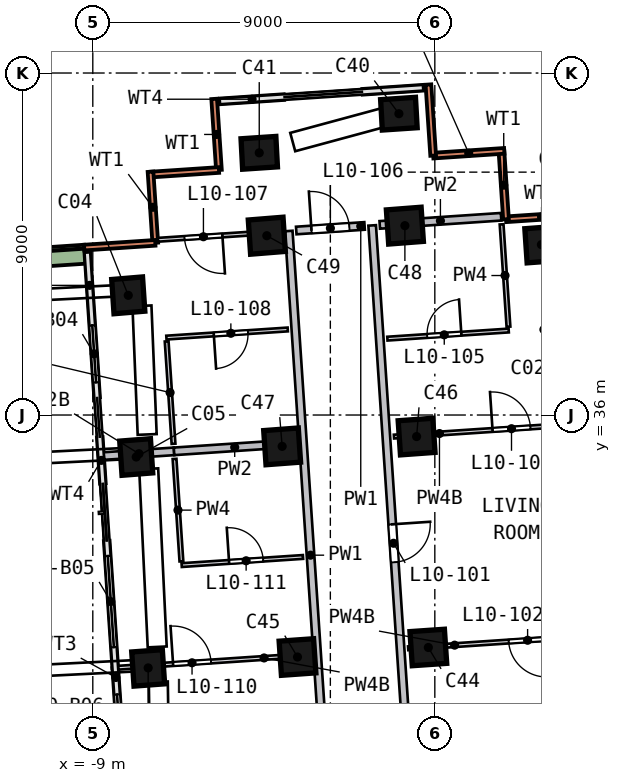
"""IFC4 building model, lengths in metres.
Left out: names, types, materials, properties, quantities, classifications, styles, units other than length and angle.
Written with IfcOpenShell. Run it as: python <this file> out.ifc"""

import sys

from ifc_helpers import new_model, si_unit, direction, frame, frame_2d, origin, origin_2d, place, context, subcontext, project, spatial, rectangle, extrude, element, fill, save


model = new_model("IFC4")
c1 = context("Model", 3, precision=1e-05, world=origin(), true_north=direction((0.0, 1.0)))
c2 = subcontext(c1, "Body", "Model", "MODEL_VIEW")
j1 = project(units=[si_unit("LENGTHUNIT", "METRE"), si_unit("PLANEANGLEUNIT", "RADIAN")], contexts=[c1])
p1 = place(None, origin())
s1 = spatial("IfcSite", under=j1, at=p1, CompositionType="ELEMENT")
p2 = place(p1, origin())
s2 = spatial("IfcBuilding", under=s1, at=p2, CompositionType="ELEMENT")
p3 = place(p2, frame((0.0, 0.0, 49.5)))
s3 = spatial("IfcBuildingStorey", under=s2, at=p3, CompositionType="ELEMENT", Elevation=49.5)
p4 = place(p3, frame((3.514, 35.74, 0.0), z_axis=(-0.16539803, -0.025428438, 0.985899024), x_axis=(-0.069309244, 0.997495574, 0.014099965)))
e1 = element("IfcColumn", 1, at=p4, inside=s3, PredefinedType="COLUMN", context=c2, shape_type="SweptSolid", body=[
    extrude(rectangle(XDim=0.9, YDim=0.8, at=origin_2d()), origin(), (0.0, 0.0, 1.0), 3.236),
])
p5 = place(p3, frame((3.032, 40.542, 0.0), z_axis=(-0.185536283, -0.047999063, 0.981464405), x_axis=(-0.073598719, 0.996679535, 0.034830047)))
e2 = element("IfcColumn", 2, at=p5, inside=s3, PredefinedType="COLUMN", context=c2, shape_type="SweptSolid", body=[
    extrude(rectangle(XDim=0.9, YDim=0.8, at=origin_2d()), origin(), (0.0, 0.0, 1.0), 3.25),
])
p6 = place(p3, frame((-7.848, 39.271, 0.0), z_axis=(-0.178617656, -0.098749191, 0.978950627), x_axis=(0.082596476, -0.992943836, -0.085090309)))
e3 = element("IfcColumn", 3, at=p6, inside=s3, PredefinedType="COLUMN", context=c2, shape_type="SweptSolid", body=[
    extrude(rectangle(XDim=0.9, YDim=0.8, at=origin_2d()), origin(), (0.0, 0.0, 1.0), 3.259),
])
p7 = place(p3, frame((-7.66, 34.99, 0.0), z_axis=(-0.161138739, -0.077933923, 0.983849892), x_axis=(0.077576177, -0.994793135, -0.066095046)))
e4 = element("IfcColumn", 4, at=p7, inside=s3, PredefinedType="COLUMN", context=c2, shape_type="SweptSolid", body=[
    extrude(rectangle(XDim=0.9, YDim=0.8, at=origin_2d()), origin(), (0.0, 0.0, 1.0), 3.242),
])
p8 = place(p3, frame((-7.376, 29.414, 0.0), z_axis=(-0.137221025, -0.056462705, 0.988929903), x_axis=(0.073632546, -0.996193284, -0.046660369)))
e5 = element("IfcColumn", 5, at=p8, inside=s3, PredefinedType="COLUMN", context=c2, shape_type="SweptSolid", body=[
    extrude(rectangle(XDim=0.9, YDim=0.8, at=origin_2d()), origin(), (0.0, 0.0, 1.0), 3.226),
])
p9 = place(p3, frame((-0.699, 44.01, 0.0), z_axis=(-0.200858384, -0.065381835, 0.977435995), x_axis=(-0.977339154, -0.054677247, -0.204495909)))
e6 = element("IfcColumn", 6, at=p9, inside=s3, PredefinedType="COLUMN", context=c2, shape_type="SweptSolid", body=[
    extrude(rectangle(XDim=0.9, YDim=0.8, at=origin_2d()), origin(), (0.0, 0.0, 1.0), 3.264),
])
p10 = place(p3, frame((-4.38, 43.001, 0.0), z_axis=(-0.19593553, -0.082562147, 0.977134975), x_axis=(-0.97833702, -0.051448422, -0.200523653)))
e7 = element("IfcColumn", 7, at=p10, inside=s3, PredefinedType="COLUMN", context=c2, shape_type="SweptSolid", body=[
    extrude(rectangle(XDim=0.9, YDim=0.8, at=origin_2d()), origin(), (0.0, 0.0, 1.0), 3.265),
])
p11 = place(p3, frame((-0.001, 29.909, 0.0), z_axis=(-0.140009368, -0.021592354, 0.989914717), x_axis=(-0.06878046, 0.997559272, 0.012031081)))
e8 = element("IfcColumn", 8, at=p11, inside=s3, PredefinedType="COLUMN", context=c2, shape_type="SweptSolid", body=[
    extrude(rectangle(XDim=0.9, YDim=0.9, at=origin_2d()), origin(), (0.0, 0.0, 1.0), 3.222),
])
p12 = place(p3, frame((-3.445, 29.677, 0.0), z_axis=(-0.13875341, -0.03786938, 0.989602648), x_axis=(-0.070866168, 0.997086578, 0.028219537)))
e9 = element("IfcColumn", 9, at=p12, inside=s3, PredefinedType="COLUMN", context=c2, shape_type="SweptSolid", body=[
    extrude(rectangle(XDim=0.9, YDim=0.9, at=origin_2d()), origin(), (0.0, 0.0, 1.0), 3.223),
])
p13 = place(p3, frame((-0.28, 35.486, 0.0), z_axis=(-0.163975747, -0.043294424, 0.985513849), x_axis=(-0.07220614, 0.996883302, 0.0317798)))
e10 = element("IfcColumn", 10, at=p13, inside=s3, PredefinedType="COLUMN", context=c2, shape_type="SweptSolid", body=[
    extrude(rectangle(XDim=0.9, YDim=0.9, at=origin_2d()), origin(), (0.0, 0.0, 1.0), 3.237),
])
p14 = place(p3, frame((-3.819, 35.248, 0.0), z_axis=(-0.162661052, -0.059923789, 0.984860661), x_axis=(-0.074728795, 0.996035363, 0.048261394)))
e11 = element("IfcColumn", 11, at=p14, inside=s3, PredefinedType="COLUMN", context=c2, shape_type="SweptSolid", body=[
    extrude(rectangle(XDim=0.9, YDim=0.9, at=origin_2d()), origin(), (0.0, 0.0, 1.0), 3.239),
])
p15 = place(p3, frame((-0.558, 41.063, 0.0), z_axis=(-0.187533048, -0.064736408, 0.980122724), x_axis=(-0.076631345, 0.995748863, 0.051106146)))
e12 = element("IfcColumn", 12, at=p15, inside=s3, PredefinedType="COLUMN", context=c2, shape_type="SweptSolid", body=[
    extrude(rectangle(XDim=0.9, YDim=0.9, at=origin_2d()), origin(), (0.0, 0.0, 1.0), 3.255),
])
p16 = place(p3, frame((-4.193, 40.819, 0.0), z_axis=(-0.186069039, -0.081756472, 0.979129303), x_axis=(-0.080065475, 0.994479546, 0.067822946)))
e13 = element("IfcColumn", 13, at=p16, inside=s3, PredefinedType="COLUMN", context=c2, shape_type="SweptSolid", body=[
    extrude(rectangle(XDim=0.9, YDim=0.9, at=origin_2d()), origin(), (0.0, 0.0, 1.0), 3.258),
])
p17 = place(p3, frame((3.744, 41.276, 0.0), z_axis=(0.0, 0.0, 1.0), x_axis=(-0.997757997, -0.066925174, 0.0)))
e14 = element("IfcWall", 14, at=p17, inside=s3, PredefinedType="SOLIDWALL", context=c2, shape_type="SweptSolid", body=[
    extrude(rectangle(XDim=1.875, YDim=0.15, at=frame_2d((0.938, 0.0))), origin(), (0.0, 0.0, 1.0), 3.19),
])
p18 = place(p3, frame((1.873, 41.151, 0.0), z_axis=(0.0, 0.0, 1.0), x_axis=(-0.067005139, 0.99775263, 0.0)))
e15 = element("IfcWall", 15, at=p18, inside=s3, PredefinedType="SOLIDWALL", context=c2, shape_type="SweptSolid", body=[
    extrude(rectangle(XDim=1.8, YDim=0.15, at=frame_2d((0.9, 0.0))), origin(), (0.0, 0.0, 1.0), 3.19),
])
for number, where, z_axis, x_axis in (
    (16, (1.828, 42.952, 0.0), (0.0, 0.0, 1.0), (-0.998, -0.067, 0.0)),
    (17, (-0.043, 42.826, 0.0), (0.0, 0.0, 1.0), (-0.067, 0.998, 0.0)),
    (18, (-5.806, 44.319, 0.0), (0.0, 0.0, 1.0), (0.067, -0.998, 0.0)),
):
    element("IfcWall", number, at=place(p3, frame(where, z_axis=z_axis, x_axis=x_axis)), inside=s3, PredefinedType="SOLIDWALL", context=c2, shape_type="SweptSolid", body=[
        extrude(rectangle(XDim=1.875, YDim=0.15, at=frame_2d((0.938, 0.0))), origin(), (0.0, 0.0, 1.0), 3.19),
    ])
p19 = place(p3, frame((-5.68, 42.448, 0.0), z_axis=(0.0, 0.0, 1.0), x_axis=(-0.997762296, -0.066861059, 0.0)))
e19 = element("IfcWall", 19, at=p19, inside=s3, PredefinedType="SOLIDWALL", context=c2, shape_type="SweptSolid", body=[
    extrude(rectangle(XDim=1.8, YDim=0.15, at=frame_2d((0.9, 0.0))), origin(), (0.0, 0.0, 1.0), 3.19),
])
for number, where, z_axis, x_axis in (
    (20, (-7.481, 42.402, 0.0), (0.0, 0.0, 1.0), (0.067, -0.998, 0.0)),
    (21, (-7.356, 40.531, 0.0), (0.0, 0.0, 1.0), (-0.998, -0.067, 0.0)),
):
    element("IfcWall", number, at=place(p3, frame(where, z_axis=z_axis, x_axis=x_axis)), inside=s3, PredefinedType="SOLIDWALL", context=c2, shape_type="SweptSolid", body=[
        extrude(rectangle(XDim=1.875, YDim=0.15, at=frame_2d((0.938, 0.0))), origin(), (0.0, 0.0, 1.0), 3.19),
    ])
p20 = place(p3, frame((-0.318, 44.612, 0.0), z_axis=(0.0, 0.0, 1.0), x_axis=(-0.997751705, -0.06701891, 0.0)))
e22 = element("IfcWall", 22, at=p20, inside=s3, PredefinedType="SOLIDWALL", context=c2, shape_type="SweptSolid", body=[
    extrude(rectangle(XDim=1.588, YDim=0.15, at=frame_2d((0.794, 0.0))), origin(), (0.0, 0.0, 1.0), 2.425),
])
p21 = place(p3, frame((-3.97, 44.367, 0.0), z_axis=(0.0, 0.0, 1.0), x_axis=(-0.997753539, -0.066991608, 0.0)))
e23 = element("IfcWall", 23, at=p21, inside=s3, PredefinedType="SOLIDWALL", context=c2, shape_type="SweptSolid", body=[
    extrude(rectangle(XDim=1.68, YDim=0.15, at=frame_2d((0.84, 0.0))), origin(), (0.0, 0.0, 1.0), 2.425),
])
p22 = place(p3, frame((-9.142, 40.266, 0.0), z_axis=(0.0, 0.0, 1.0), x_axis=(0.066922803, -0.997758156, 0.0)))
e24 = element("IfcWall", 24, at=p22, inside=s3, PredefinedType="SOLIDWALL", context=c2, shape_type="SweptSolid", body=[
    extrude(rectangle(XDim=3.812, YDim=0.15, at=frame_2d((1.906, 0.0))), origin(), (0.0, 0.0, 1.0), 2.425),
])
p23 = place(p22, frame((1.912, 0.0, 0.0)))
e25 = element("IfcOpeningElement", 25, at=p23, cuts=e24, PredefinedType="OPENING", context=c2, shape_type="SweptSolid", body=[
    extrude(rectangle(XDim=1.5, YDim=2.4, at=frame_2d((0.75, 1.2))), frame((0.0, 0.085, 0.0), z_axis=(0.0, -1.0, 0.0), x_axis=(1.0, 0.0, 0.0)), (0.0, 0.0, 1.0), 0.17),
])
p24 = place(p3, frame((-8.634, 32.687, 0.0), z_axis=(0.0, 0.0, 1.0), x_axis=(0.066973677, -0.997754743, 0.0)))
e26 = element("IfcWall", 26, at=p24, inside=s3, PredefinedType="SOLIDWALL", context=c2, shape_type="SweptSolid", body=[
    extrude(rectangle(XDim=3.35, YDim=0.15, at=frame_2d((1.675, 0.0))), origin(), (0.0, 0.0, 1.0), 2.425),
])
p25 = place(p24, frame((0.4, 0.0, 0.0)))
e27 = element("IfcOpeningElement", 27, at=p25, cuts=e26, PredefinedType="OPENING", context=c2, shape_type="SweptSolid", body=[
    extrude(rectangle(XDim=2.4, YDim=2.4, at=frame_2d((1.2, 1.2))), frame((0.0, 0.085, 0.0), z_axis=(0.0, -1.0, 0.0), x_axis=(1.0, 0.0, 0.0)), (0.0, 0.0, 1.0), 0.17),
])
p26 = place(p3, frame((-8.409, 29.344, 0.0), z_axis=(0.0, 0.0, 1.0), x_axis=(0.066995591, -0.997753272, 0.0)))
e28 = element("IfcWall", 28, at=p26, inside=s3, PredefinedType="SOLIDWALL", context=c2, shape_type="SweptSolid", body=[
    extrude(rectangle(XDim=3.502, YDim=0.15, at=frame_2d((1.751, 0.0))), origin(), (0.0, 0.0, 1.0), 2.425),
])
p27 = place(p26, frame((0.702, 0.0, 0.0)))
e29 = element("IfcOpeningElement", 29, at=p27, cuts=e28, PredefinedType="OPENING", context=c2, shape_type="SweptSolid", body=[
    extrude(rectangle(XDim=2.4, YDim=2.4, at=frame_2d((1.2, 1.2))), frame((0.0, 0.085, 0.0), z_axis=(0.0, -1.0, 0.0), x_axis=(1.0, 0.0, 0.0)), (0.0, 0.0, 1.0), 0.17),
])
p28 = place(p3, frame((-8.816, 35.414, 0.0), z_axis=(0.0, 0.0, 1.0), x_axis=(0.066984891, -0.99775399, 0.0)))
e30 = element("IfcWall", 30, at=p28, inside=s3, PredefinedType="SOLIDWALL", context=c2, shape_type="SweptSolid", body=[
    extrude(rectangle(XDim=1.217, YDim=0.15, at=frame_2d((0.609, 0.0))), origin(), (0.0, 0.0, 1.0), 2.425),
])
p29 = place(p3, frame((-9.216, 40.231, 0.0), z_axis=(0.0, 0.0, 1.0), x_axis=(-0.997752279, -0.067010365, 0.0)))
e31 = element("IfcWall", 31, at=p29, inside=s3, PredefinedType="SOLIDWALL", context=c2, shape_type="SweptSolid", body=[
    extrude(rectangle(XDim=3.199, YDim=0.5, at=frame_2d((1.599, 0.0))), origin(), (0.0, 0.0, 1.0), 0.7),
])
p30 = place(p3, frame((-2.287, 17.645, 0.0), z_axis=(0.0, 0.0, 1.0), x_axis=(-0.066974116, 0.997754713, 0.0)))
e32 = element("IfcWall", 32, at=p30, inside=s3, PredefinedType="SOLIDWALL", context=c2, shape_type="SweptSolid", body=[
    extrude(rectangle(XDim=23.25, YDim=0.2, at=frame_2d((11.625, 0.0))), origin(), (0.0, 0.0, 1.0), 3.19),
])
p31 = place(p30, frame((4.95, 0.0, 0.0)))
e33 = element("IfcOpeningElement", 33, at=p31, cuts=e32, PredefinedType="OPENING", context=c2, shape_type="SweptSolid", body=[
    extrude(rectangle(XDim=1.0, YDim=2.1, at=frame_2d((0.5, 1.05))), frame((0.0, 0.11, 0.0), z_axis=(0.0, -1.0, 0.0), x_axis=(1.0, 0.0, 0.0)), (0.0, 0.0, 1.0), 0.22),
])
p32 = place(p3, frame((-3.646, 40.855, 0.0), z_axis=(0.0, 0.0, 1.0), x_axis=(0.997748437, 0.067067555, 0.0)))
e34 = element("IfcWall", 34, at=p32, inside=s3, PredefinedType="SOLIDWALL", context=c2, shape_type="SweptSolid", body=[
    extrude(rectangle(XDim=1.802, YDim=0.2, at=frame_2d((0.901, 0.0))), origin(), (0.0, 0.0, 1.0), 3.19),
])
p33 = place(p32, frame((0.4, 0.0, 0.0)))
e35 = element("IfcOpeningElement", 35, at=p33, cuts=e34, PredefinedType="OPENING", context=c2, shape_type="SweptSolid", body=[
    extrude(rectangle(XDim=1.0, YDim=2.1, at=frame_2d((0.5, 1.05))), frame((0.0, 0.11, 0.0), z_axis=(0.0, -1.0, 0.0), x_axis=(1.0, 0.0, 0.0)), (0.0, 0.0, 1.0), 0.22),
])
p34 = place(p3, frame((-1.649, 40.99, 0.0), z_axis=(0.0, 0.0, 1.0), x_axis=(0.066973147, -0.997754778, 0.0)))
e36 = element("IfcWall", 36, at=p34, inside=s3, PredefinedType="SOLIDWALL", context=c2, shape_type="SweptSolid", body=[
    extrude(rectangle(XDim=23.05, YDim=0.2, at=frame_2d((11.525, 0.0))), origin(), (0.0, 0.0, 1.0), 3.19),
])
p35 = place(p34, frame((7.883, 0.0, 0.0)))
e37 = element("IfcOpeningElement", 37, at=p35, cuts=e36, PredefinedType="OPENING", context=c2, shape_type="SweptSolid", body=[
    extrude(rectangle(XDim=1.0, YDim=2.1, at=frame_2d((0.5, 1.05))), frame((0.0, 0.11, 0.0), z_axis=(0.0, -1.0, 0.0), x_axis=(1.0, 0.0, 0.0)), (0.0, 0.0, 1.0), 0.22),
])
p36 = place(p3, frame((-6.862, 35.044, 0.0), z_axis=(0.0, 0.0, 1.0), x_axis=(-0.997750574, -0.067035748, 0.0)))
e38 = element("IfcWall", 38, at=p36, inside=s3, PredefinedType="SOLIDWALL", context=c2, shape_type="SweptSolid", body=[
    extrude(rectangle(XDim=1.85, YDim=0.2, at=frame_2d((0.925, 0.0))), origin(), (0.0, 0.0, 1.0), 2.69),
])
for number, where, z_axis, x_axis in (
    (39, (-3.669, 35.258, 0.0), (0.0, 0.0, 1.0), (-0.998, -0.067, 0.0)),
    (40, (-1.449, 41.003, 0.0), (0.0, 0.0, 1.0), (0.998, 0.067, 0.0)),
):
    element("IfcWall", number, at=place(p3, frame(where, z_axis=z_axis, x_axis=x_axis)), inside=s3, PredefinedType="SOLIDWALL", context=c2, shape_type="SweptSolid", body=[
        extrude(rectangle(XDim=3.2, YDim=0.2, at=frame_2d((1.6, 0.0))), origin(), (0.0, 0.0, 1.0), 3.19),
    ])
p37 = place(p3, frame((-7.056, 37.938, 0.0), z_axis=(0.0, 0.0, 1.0), x_axis=(0.066909082, -0.997759077, 0.0)))
e41 = element("IfcWall", 41, at=p37, inside=s3, PredefinedType="PARTITIONING", context=c2, shape_type="SweptSolid", body=[
    extrude(rectangle(XDim=2.7, YDim=0.1, at=frame_2d((1.35, 0.0))), origin(), (0.0, 0.0, 1.0), 3.19),
])
p38 = place(p3, frame((-6.849, 34.844, 0.0), z_axis=(0.0, 0.0, 1.0), x_axis=(0.066915118, -0.997758672, 0.0)))
e42 = element("IfcWall", 42, at=p38, inside=s3, PredefinedType="PARTITIONING", context=c2, shape_type="SweptSolid", body=[
    extrude(rectangle(XDim=2.7, YDim=0.1, at=frame_2d((1.35, 0.0))), origin(), (0.0, 0.0, 1.0), 3.19),
])
p39 = place(p3, frame((-8.334, 29.349, 0.0), z_axis=(0.0, 0.0, 1.0), x_axis=(0.997755754, 0.066958606, 0.0)))
e43 = element("IfcWall", 43, at=p39, inside=s3, PredefinedType="PARTITIONING", context=c2, shape_type="SweptSolid", body=[
    extrude(rectangle(XDim=5.05, YDim=0.1, at=frame_2d((2.525, 0.0))), origin(), (0.0, 0.0, 1.0), 2.69),
])
p40 = place(p39, frame((1.45, 0.0, 0.0)))
e44 = element("IfcOpeningElement", 44, at=p40, cuts=e43, PredefinedType="OPENING", context=c2, shape_type="SweptSolid", body=[
    extrude(rectangle(XDim=1.0, YDim=2.1, at=frame_2d((0.5, 1.05))), frame((0.0, 0.06, 0.0), z_axis=(0.0, -1.0, 0.0), x_axis=(1.0, 0.0, 0.0)), (0.0, 0.0, 1.0), 0.12),
])
p41 = place(p3, frame((-4.043, 40.829, 0.0), z_axis=(0.0, 0.0, 1.0), x_axis=(-0.99775516, -0.066967464, 0.0)))
e45 = element("IfcWall", 45, at=p41, inside=s3, PredefinedType="PARTITIONING", context=c2, shape_type="SweptSolid", body=[
    extrude(rectangle(XDim=3.252, YDim=0.1, at=frame_2d((1.626, 0.0))), origin(), (0.0, 0.0, 1.0), 3.19),
])
p42 = place(p41, frame((1.55, 0.0, 0.0)))
e46 = element("IfcOpeningElement", 46, at=p42, cuts=e45, PredefinedType="OPENING", context=c2, shape_type="SweptSolid", body=[
    extrude(rectangle(XDim=1.0, YDim=2.1, at=frame_2d((0.5, 1.05))), frame((0.0, 0.06, 0.0), z_axis=(0.0, -1.0, 0.0), x_axis=(1.0, 0.0, 0.0)), (0.0, 0.0, 1.0), 0.12),
])
p43 = place(p3, frame((-3.87, 38.251, 0.0), z_axis=(0.0, 0.0, 1.0), x_axis=(-0.997753992, -0.06698486, 0.0)))
e47 = element("IfcWall", 47, at=p43, inside=s3, PredefinedType="PARTITIONING", context=c2, shape_type="SweptSolid", body=[
    extrude(rectangle(XDim=3.2, YDim=0.1, at=frame_2d((1.6, 0.0))), origin(), (0.0, 0.0, 1.0), 3.19),
])
p44 = place(p43, frame((1.05, 0.0, 0.0)))
e48 = element("IfcOpeningElement", 48, at=p44, cuts=e47, PredefinedType="OPENING", context=c2, shape_type="SweptSolid", body=[
    extrude(rectangle(XDim=0.9, YDim=2.1, at=frame_2d((0.45, 1.05))), frame((0.0, 0.06, 0.0), z_axis=(0.0, -1.0, 0.0), x_axis=(1.0, 0.0, 0.0)), (0.0, 0.0, 1.0), 0.12),
])
p45 = place(p3, frame((-6.661, 32.051, 0.0), z_axis=(0.0, 0.0, 1.0), x_axis=(0.997753992, 0.06698486, 0.0)))
e49 = element("IfcWall", 49, at=p45, inside=s3, PredefinedType="PARTITIONING", context=c2, shape_type="SweptSolid", body=[
    extrude(rectangle(XDim=3.2, YDim=0.1, at=frame_2d((1.6, 0.0))), origin(), (0.0, 0.0, 1.0), 3.19),
])
p46 = place(p45, frame((1.25, 0.0, 0.0)))
e50 = element("IfcOpeningElement", 50, at=p46, cuts=e49, PredefinedType="OPENING", context=c2, shape_type="SweptSolid", body=[
    extrude(rectangle(XDim=0.9, YDim=2.1, at=frame_2d((0.45, 1.05))), frame((0.0, 0.06, 0.0), z_axis=(0.0, -1.0, 0.0), x_axis=(1.0, 0.0, 0.0)), (0.0, 0.0, 1.0), 0.12),
])
p47 = place(p3, frame((-1.248, 38.01, 0.0), z_axis=(0.0, 0.0, 1.0), x_axis=(0.997753992, 0.06698486, 0.0)))
e51 = element("IfcWall", 51, at=p47, inside=s3, PredefinedType="PARTITIONING", context=c2, shape_type="SweptSolid", body=[
    extrude(rectangle(XDim=3.2, YDim=0.1, at=frame_2d((1.6, 0.0))), origin(), (0.0, 0.0, 1.0), 3.19),
])
p48 = place(p47, frame((1.05, 0.0, 0.0)))
e52 = element("IfcOpeningElement", 52, at=p48, cuts=e51, PredefinedType="OPENING", context=c2, shape_type="SweptSolid", body=[
    extrude(rectangle(XDim=0.9, YDim=2.1, at=frame_2d((0.45, 1.05))), frame((0.0, 0.06, 0.0), z_axis=(0.0, -1.0, 0.0), x_axis=(1.0, 0.0, 0.0)), (0.0, 0.0, 1.0), 0.12),
])
p49 = place(p3, frame((-1.075, 35.432, 0.0), z_axis=(0.0, 0.0, 1.0), x_axis=(0.997755754, 0.066958606, 0.0)))
e53 = element("IfcWall", 53, at=p49, inside=s3, PredefinedType="PARTITIONING", context=c2, shape_type="SweptSolid", body=[
    extrude(rectangle(XDim=5.05, YDim=0.1, at=frame_2d((2.525, 0.0))), origin(), (0.0, 0.0, 1.0), 2.69),
])
p50 = place(p49, frame((2.6, 0.0, 0.0)))
e54 = element("IfcOpeningElement", 54, at=p50, cuts=e53, PredefinedType="OPENING", context=c2, shape_type="SweptSolid", body=[
    extrude(rectangle(XDim=1.0, YDim=2.1, at=frame_2d((0.5, 1.05))), frame((0.0, 0.06, 0.0), z_axis=(0.0, -1.0, 0.0), x_axis=(1.0, 0.0, 0.0)), (0.0, 0.0, 1.0), 0.12),
])
p51 = place(p3, frame((4.337, 30.2, 0.0), z_axis=(0.0, 0.0, 1.0), x_axis=(-0.997755754, -0.066958606, 0.0)))
e55 = element("IfcWall", 55, at=p51, inside=s3, PredefinedType="PARTITIONING", context=c2, shape_type="SweptSolid", body=[
    extrude(rectangle(XDim=5.05, YDim=0.1, at=frame_2d((2.525, 0.0))), origin(), (0.0, 0.0, 1.0), 2.69),
])
p52 = place(p51, frame((1.4, 0.0, 0.0)))
e56 = element("IfcOpeningElement", 56, at=p52, cuts=e55, PredefinedType="OPENING", context=c2, shape_type="SweptSolid", body=[
    extrude(rectangle(XDim=1.0, YDim=2.1, at=frame_2d((0.5, 1.05))), frame((0.0, 0.06, 0.0), z_axis=(0.0, -1.0, 0.0), x_axis=(1.0, 0.0, 0.0)), (0.0, 0.0, 1.0), 0.12),
])
p53 = place(p3, frame((1.938, 38.324, 0.0), z_axis=(0.0, 0.0, 1.0), x_axis=(-0.066909082, 0.997759077, 0.0)))
e57 = element("IfcWall", 57, at=p53, inside=s3, PredefinedType="PARTITIONING", context=c2, shape_type="SweptSolid", body=[
    extrude(rectangle(XDim=2.7, YDim=0.1, at=frame_2d((1.35, 0.0))), origin(), (0.0, 0.0, 1.0), 3.19),
])
p54 = place(p23, origin())
e58 = element("IfcDoor", 58, at=p54, inside=s3, OperationType="SLIDING_TO_LEFT", PredefinedType="DOOR", context=c2, shape_type="SweptSolid", body=[
    extrude(rectangle(XDim=1.5, YDim=2.4, at=frame_2d((0.75, 1.2))), frame((0.0, 0.025, 0.0), z_axis=(0.0, -1.0, 0.0), x_axis=(1.0, 0.0, 0.0)), (0.0, 0.0, 1.0), 0.05),
])
fill(e25, e58)
p55 = place(p25, origin())
e59 = element("IfcDoor", 59, at=p55, inside=s3, OperationType="SLIDING_TO_RIGHT", PredefinedType="DOOR", context=c2, shape_type="SweptSolid", body=[
    extrude(rectangle(XDim=2.4, YDim=2.4, at=frame_2d((1.2, 1.2))), frame((0.0, 0.025, 0.0), z_axis=(0.0, -1.0, 0.0), x_axis=(1.0, 0.0, 0.0)), (0.0, 0.0, 1.0), 0.05),
])
fill(e27, e59)
p56 = place(p27, origin())
e60 = element("IfcDoor", 60, at=p56, inside=s3, OperationType="SLIDING_TO_LEFT", PredefinedType="DOOR", context=c2, shape_type="SweptSolid", body=[
    extrude(rectangle(XDim=2.4, YDim=2.4, at=frame_2d((1.2, 1.2))), frame((0.0, 0.025, 0.0), z_axis=(0.0, -1.0, 0.0), x_axis=(1.0, 0.0, 0.0)), (0.0, 0.0, 1.0), 0.05),
])
fill(e29, e60)
p57 = place(p35, origin())
e61 = element("IfcDoor", 61, at=p57, inside=s3, OperationType="SINGLE_SWING_LEFT", PredefinedType="DOOR", context=c2, shape_type="SweptSolid", body=[
    extrude(rectangle(XDim=1.0, YDim=2.1, at=frame_2d((0.5, 1.05))), frame((0.0, 0.025, 0.0), z_axis=(0.0, -1.0, 0.0), x_axis=(1.0, 0.0, 0.0)), (0.0, 0.0, 1.0), 0.05),
])
fill(e37, e61)
p58 = place(p52, origin())
e62 = element("IfcDoor", 62, at=p58, inside=s3, OperationType="SINGLE_SWING_LEFT", PredefinedType="DOOR", context=c2, shape_type="SweptSolid", body=[
    extrude(rectangle(XDim=1.0, YDim=2.1, at=frame_2d((0.5, 1.05))), frame((0.0, 0.025, 0.0), z_axis=(0.0, -1.0, 0.0), x_axis=(1.0, 0.0, 0.0)), (0.0, 0.0, 1.0), 0.05),
])
fill(e56, e62)
p59 = place(p50, origin())
e63 = element("IfcDoor", 63, at=p59, inside=s3, OperationType="SINGLE_SWING_LEFT", PredefinedType="DOOR", context=c2, shape_type="SweptSolid", body=[
    extrude(rectangle(XDim=1.0, YDim=2.1, at=frame_2d((0.5, 1.05))), frame((0.0, 0.025, 0.0), z_axis=(0.0, -1.0, 0.0), x_axis=(1.0, 0.0, 0.0)), (0.0, 0.0, 1.0), 0.05),
])
fill(e54, e63)
p60 = place(p48, origin())
e64 = element("IfcDoor", 64, at=p60, inside=s3, OperationType="SINGLE_SWING_RIGHT", PredefinedType="DOOR", context=c2, shape_type="SweptSolid", body=[
    extrude(rectangle(XDim=0.9, YDim=2.1, at=frame_2d((0.45, 1.05))), frame((0.0, 0.025, 0.0), z_axis=(0.0, -1.0, 0.0), x_axis=(1.0, 0.0, 0.0)), (0.0, 0.0, 1.0), 0.05),
])
fill(e52, e64)
p61 = place(p33, origin())
e65 = element("IfcDoor", 65, at=p61, inside=s3, OperationType="SINGLE_SWING_LEFT", PredefinedType="DOOR", context=c2, shape_type="SweptSolid", body=[
    extrude(rectangle(XDim=1.0, YDim=2.1, at=frame_2d((0.5, 1.05))), frame((0.0, 0.025, 0.0), z_axis=(0.0, -1.0, 0.0), x_axis=(1.0, 0.0, 0.0)), (0.0, 0.0, 1.0), 0.05),
])
fill(e35, e65)
p62 = place(p42, origin())
e66 = element("IfcDoor", 66, at=p62, inside=s3, OperationType="SINGLE_SWING_LEFT", PredefinedType="DOOR", context=c2, shape_type="SweptSolid", body=[
    extrude(rectangle(XDim=1.0, YDim=2.1, at=frame_2d((0.5, 1.05))), frame((0.0, 0.025, 0.0), z_axis=(0.0, -1.0, 0.0), x_axis=(1.0, 0.0, 0.0)), (0.0, 0.0, 1.0), 0.05),
])
fill(e46, e66)
p63 = place(p44, origin())
e67 = element("IfcDoor", 67, at=p63, inside=s3, OperationType="SINGLE_SWING_RIGHT", PredefinedType="DOOR", context=c2, shape_type="SweptSolid", body=[
    extrude(rectangle(XDim=0.9, YDim=2.1, at=frame_2d((0.45, 1.05))), frame((0.0, 0.025, 0.0), z_axis=(0.0, -1.0, 0.0), x_axis=(1.0, 0.0, 0.0)), (0.0, 0.0, 1.0), 0.05),
])
fill(e48, e67)
p64 = place(p40, origin())
e68 = element("IfcDoor", 68, at=p64, inside=s3, OperationType="SINGLE_SWING_LEFT", PredefinedType="DOOR", context=c2, shape_type="SweptSolid", body=[
    extrude(rectangle(XDim=1.0, YDim=2.1, at=frame_2d((0.5, 1.05))), frame((0.0, 0.025, 0.0), z_axis=(0.0, -1.0, 0.0), x_axis=(1.0, 0.0, 0.0)), (0.0, 0.0, 1.0), 0.05),
])
fill(e44, e68)
p65 = place(p46, origin())
e69 = element("IfcDoor", 69, at=p65, inside=s3, OperationType="SINGLE_SWING_LEFT", PredefinedType="DOOR", context=c2, shape_type="SweptSolid", body=[
    extrude(rectangle(XDim=0.9, YDim=2.1, at=frame_2d((0.45, 1.05))), frame((0.0, 0.025, 0.0), z_axis=(0.0, -1.0, 0.0), x_axis=(1.0, 0.0, 0.0)), (0.0, 0.0, 1.0), 0.05),
])
fill(e50, e69)
save(model, sys.argv[1])
